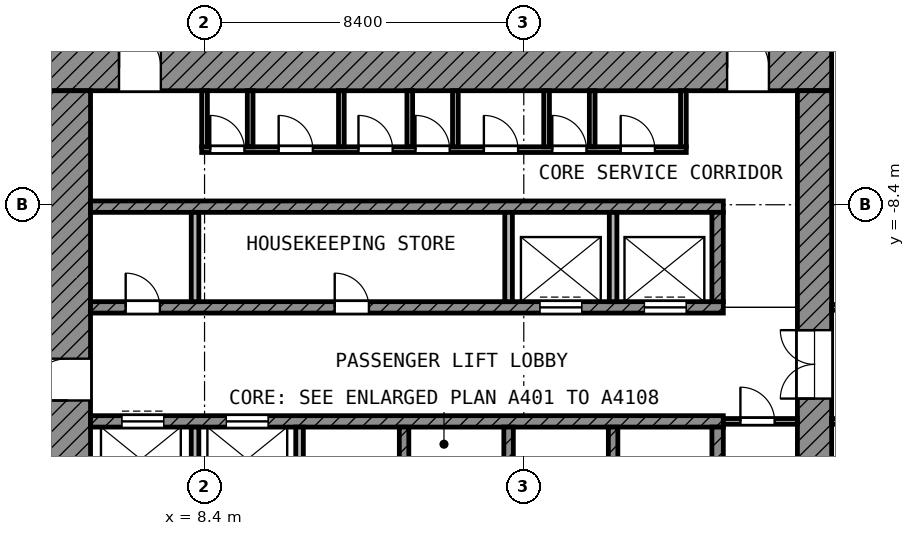
"""IFC4 building model, lengths in metres.
Left out: names, types, materials, properties, quantities, classifications, styles, units other than length and angle.
Written with IfcOpenShell. Run it as: python <this file> out.ifc"""

import sys

from ifc_helpers import new_model, si_unit, direction, frame, frame_2d, origin, place, context, subcontext, project, spatial, rectangle, extrude, element, fill, save


model = new_model("IFC4")
c1 = context("Model", 3, precision=1e-05, world=origin(), true_north=direction((0.0, 1.0)))
c2 = subcontext(c1, "Body", "Model", "MODEL_VIEW")
j1 = project(units=[si_unit("LENGTHUNIT", "METRE"), si_unit("PLANEANGLEUNIT", "RADIAN")], contexts=[c1])
p1 = place(None, origin())
s1 = spatial("IfcSite", under=j1, at=p1, CompositionType="ELEMENT")
p2 = place(p1, origin())
s2 = spatial("IfcBuilding", under=s1, at=p2, CompositionType="ELEMENT")
p3 = place(p2, frame((0.0, 0.0, 175.2)))
s3 = spatial("IfcBuildingStorey", under=s2, at=p3, CompositionType="ELEMENT", Elevation=175.2)
p4 = place(p3, frame((4.2, -4.8, 0.0), z_axis=(0.0, 0.0, 1.0), x_axis=(1.0, 0.0, 0.0)))
e1 = element("IfcWall", 1, at=p4, inside=s3, PredefinedType="SHEAR", context=c2, shape_type="SweptSolid", body=[
    extrude(rectangle(XDim=20.7, YDim=1.2, at=frame_2d((10.35, 0.0))), origin(), (0.0, 0.0, 1.0), 3.6),
])
p5 = place(p4, frame((1.95, 0.0, 0.0)))
e2 = element("IfcOpeningElement", 2, at=p5, cuts=e1, PredefinedType="OPENING", context=c2, shape_type="SweptSolid", body=[
    extrude(rectangle(XDim=1.1, YDim=2.1, at=frame_2d((0.55, 1.05))), frame((0.0, 0.61, 0.0), z_axis=(0.0, -1.0, 0.0), x_axis=(1.0, 0.0, 0.0)), (0.0, 0.0, 1.0), 1.22),
])
p6 = place(p4, frame((17.95, 0.0, 0.0)))
e3 = element("IfcOpeningElement", 3, at=p6, cuts=e1, PredefinedType="OPENING", context=c2, shape_type="SweptSolid", body=[
    extrude(rectangle(XDim=1.1, YDim=2.1, at=frame_2d((0.55, 1.05))), frame((0.0, 0.61, 0.0), z_axis=(0.0, -1.0, 0.0), x_axis=(1.0, 0.0, 0.0)), (0.0, 0.0, 1.0), 1.22),
])
p7 = place(p3, frame((4.8, -24.9, 0.0), z_axis=(0.0, 0.0, 1.0), x_axis=(0.0, 1.0, 0.0)))
e4 = element("IfcWall", 4, at=p7, inside=s3, PredefinedType="SHEAR", context=c2, shape_type="SweptSolid", body=[
    extrude(rectangle(XDim=19.5, YDim=1.2, at=frame_2d((9.75, 0.0))), origin(), (0.0, 0.0, 1.0), 3.6),
])
p8 = place(p7, frame((11.35, 0.0, 0.0)))
e5 = element("IfcOpeningElement", 5, at=p8, cuts=e4, PredefinedType="OPENING", context=c2, shape_type="SweptSolid", body=[
    extrude(rectangle(XDim=1.1, YDim=2.1, at=frame_2d((0.55, 1.05))), frame((0.0, 0.61, 0.0), z_axis=(0.0, -1.0, 0.0), x_axis=(1.0, 0.0, 0.0)), (0.0, 0.0, 1.0), 1.22),
])
p9 = place(p7, frame((2.05, 0.0, 0.0)))
e6 = element("IfcOpeningElement", 6, at=p9, cuts=e4, PredefinedType="OPENING", context=c2, shape_type="SweptSolid", body=[
    extrude(rectangle(XDim=1.1, YDim=2.1, at=frame_2d((0.55, 1.05))), frame((0.0, 0.61, 0.0), z_axis=(0.0, -1.0, 0.0), x_axis=(1.0, 0.0, 0.0)), (0.0, 0.0, 1.0), 1.22),
])
p10 = place(p3, frame((24.45, -24.0, 0.0), z_axis=(0.0, 0.0, 1.0), x_axis=(0.0, 1.0, 0.0)))
e7 = element("IfcWall", 7, at=p10, inside=s3, PredefinedType="SHEAR", context=c2, shape_type="SweptSolid", body=[
    extrude(rectangle(XDim=18.6, YDim=0.9, at=frame_2d((9.3, 0.0))), origin(), (0.0, 0.0, 1.0), 3.6),
])
p11 = place(p10, frame((10.5, 0.0, 0.0)))
e8 = element("IfcOpeningElement", 8, at=p11, cuts=e7, PredefinedType="OPENING", context=c2, shape_type="SweptSolid", body=[
    extrude(rectangle(XDim=1.8, YDim=2.1, at=frame_2d((0.9, 1.05))), frame((0.0, 0.46, 0.0), z_axis=(0.0, -1.0, 0.0), x_axis=(1.0, 0.0, 0.0)), (0.0, 0.0, 1.0), 0.92),
])
p12 = place(p3, frame((5.4, -8.45, 0.0), z_axis=(0.0, 0.0, 1.0), x_axis=(1.0, 0.0, 0.0)))
e9 = element("IfcWall", 9, at=p12, inside=s3, PredefinedType="SHEAR", context=c2, shape_type="SweptSolid", body=[
    extrude(rectangle(XDim=16.65, YDim=0.3, at=frame_2d((8.325, 0.0))), origin(), (0.0, 0.0, 1.0), 3.6),
])
p13 = place(p3, frame((5.4, -11.1, 0.0), z_axis=(0.0, 0.0, 1.0), x_axis=(1.0, 0.0, 0.0)))
e10 = element("IfcWall", 10, at=p13, inside=s3, PredefinedType="SHEAR", context=c2, shape_type="SweptSolid", body=[
    extrude(rectangle(XDim=16.65, YDim=0.3, at=frame_2d((8.325, 0.0))), origin(), (0.0, 0.0, 1.0), 3.6),
])
p14 = place(p13, frame((11.825, 0.0, 0.0)))
e11 = element("IfcOpeningElement", 11, at=p14, cuts=e10, PredefinedType="OPENING", context=c2, shape_type="SweptSolid", body=[
    extrude(rectangle(XDim=1.1, YDim=2.1, at=frame_2d((0.55, 1.05))), frame((0.0, 0.16, 0.0), z_axis=(0.0, -1.0, 0.0), x_axis=(1.0, 0.0, 0.0)), (0.0, 0.0, 1.0), 0.32),
])
p15 = place(p13, frame((14.575, 0.0, 0.0)))
e12 = element("IfcOpeningElement", 12, at=p15, cuts=e10, PredefinedType="OPENING", context=c2, shape_type="SweptSolid", body=[
    extrude(rectangle(XDim=1.1, YDim=2.1, at=frame_2d((0.55, 1.05))), frame((0.0, 0.16, 0.0), z_axis=(0.0, -1.0, 0.0), x_axis=(1.0, 0.0, 0.0)), (0.0, 0.0, 1.0), 0.32),
])
p16 = place(p13, frame((0.925, 0.0, 0.0)))
e13 = element("IfcOpeningElement", 13, at=p16, cuts=e10, PredefinedType="OPENING", context=c2, shape_type="SweptSolid", body=[
    extrude(rectangle(XDim=0.9, YDim=2.1, at=frame_2d((0.45, 1.05))), frame((0.0, 0.16, 0.0), z_axis=(0.0, -1.0, 0.0), x_axis=(1.0, 0.0, 0.0)), (0.0, 0.0, 1.0), 0.32),
])
p17 = place(p13, frame((6.425, 0.0, 0.0)))
e14 = element("IfcOpeningElement", 14, at=p17, cuts=e10, PredefinedType="OPENING", context=c2, shape_type="SweptSolid", body=[
    extrude(rectangle(XDim=0.9, YDim=2.1, at=frame_2d((0.45, 1.05))), frame((0.0, 0.16, 0.0), z_axis=(0.0, -1.0, 0.0), x_axis=(1.0, 0.0, 0.0)), (0.0, 0.0, 1.0), 0.32),
])
p18 = place(p3, frame((5.4, -14.1, 0.0), z_axis=(0.0, 0.0, 1.0), x_axis=(1.0, 0.0, 0.0)))
e15 = element("IfcWall", 15, at=p18, inside=s3, PredefinedType="SHEAR", context=c2, shape_type="SweptSolid", body=[
    extrude(rectangle(XDim=16.65, YDim=0.3, at=frame_2d((8.325, 0.0))), origin(), (0.0, 0.0, 1.0), 3.6),
])
p19 = place(p18, frame((0.825, 0.0, 0.0)))
e16 = element("IfcOpeningElement", 16, at=p19, cuts=e15, PredefinedType="OPENING", context=c2, shape_type="SweptSolid", body=[
    extrude(rectangle(XDim=1.1, YDim=2.1, at=frame_2d((0.55, 1.05))), frame((0.0, 0.16, 0.0), z_axis=(0.0, -1.0, 0.0), x_axis=(1.0, 0.0, 0.0)), (0.0, 0.0, 1.0), 0.32),
])
p20 = place(p18, frame((3.575, 0.0, 0.0)))
e17 = element("IfcOpeningElement", 17, at=p20, cuts=e15, PredefinedType="OPENING", context=c2, shape_type="SweptSolid", body=[
    extrude(rectangle(XDim=1.1, YDim=2.1, at=frame_2d((0.55, 1.05))), frame((0.0, 0.16, 0.0), z_axis=(0.0, -1.0, 0.0), x_axis=(1.0, 0.0, 0.0)), (0.0, 0.0, 1.0), 0.32),
])
p21 = place(p3, frame((21.9, -10.95, 0.0), z_axis=(0.0, 0.0, 1.0), x_axis=(0.0, 1.0, 0.0)))
e18 = element("IfcWall", 18, at=p21, inside=s3, PredefinedType="SHEAR", context=c2, shape_type="SweptSolid", body=[
    extrude(rectangle(XDim=2.35, YDim=0.3, at=frame_2d((1.175, 0.0))), origin(), (0.0, 0.0, 1.0), 3.6),
])
p22 = place(p3, frame((21.9, -16.6, 0.0), z_axis=(0.0, 0.0, 1.0), x_axis=(0.0, 1.0, 0.0)))
e19 = element("IfcWall", 19, at=p22, inside=s3, PredefinedType="SHEAR", context=c2, shape_type="SweptSolid", body=[
    extrude(rectangle(XDim=2.35, YDim=0.3, at=frame_2d((1.175, 0.0))), origin(), (0.0, 0.0, 1.0), 3.6),
])
for number, where, z_axis, x_axis in (
    (20, (8.15, -10.95, 0.0), (0.0, 0.0, 1.0), (0.0, 1.0, 0.0)),
    (21, (16.4, -10.95, 0.0), (0.0, 0.0, 1.0), (0.0, 1.0, 0.0)),
    (22, (19.15, -10.95, 0.0), (0.0, 0.0, 1.0), (0.0, 1.0, 0.0)),
):
    element("IfcWall", number, at=place(p3, frame(where, z_axis=z_axis, x_axis=x_axis)), inside=s3, PredefinedType="PARTITIONING", context=c2, shape_type="SweptSolid", body=[
        extrude(rectangle(XDim=2.35, YDim=0.2, at=frame_2d((1.175, 0.0))), origin(), (0.0, 0.0, 1.0), 3.6),
    ])
for number, where, z_axis, x_axis in (
    (23, (8.15, -16.6, 0.0), (0.0, 0.0, 1.0), (0.0, 1.0, 0.0)),
    (24, (10.9, -16.6, 0.0), (0.0, 0.0, 1.0), (0.0, 1.0, 0.0)),
):
    element("IfcWall", number, at=place(p3, frame(where, z_axis=z_axis, x_axis=x_axis)), inside=s3, PredefinedType="PARTITIONING", context=c2, shape_type="SweptSolid", body=[
        extrude(rectangle(XDim=2.35, YDim=0.2, at=frame_2d((1.175, 0.0))), origin(), (0.0, 0.0, 1.0), 3.6),
    ])
for number, where, z_axis, x_axis in (
    (25, (13.65, -16.6, 0.0), (0.0, 0.0, 1.0), (0.0, 1.0, 0.0)),
    (26, (16.4, -16.6, 0.0), (0.0, 0.0, 1.0), (0.0, 1.0, 0.0)),
    (27, (19.15, -16.6, 0.0), (0.0, 0.0, 1.0), (0.0, 1.0, 0.0)),
):
    element("IfcWall", number, at=place(p3, frame(where, z_axis=z_axis, x_axis=x_axis)), inside=s3, PredefinedType="SHEAR", context=c2, shape_type="SweptSolid", body=[
        extrude(rectangle(XDim=2.35, YDim=0.25, at=frame_2d((1.175, 0.0))), origin(), (0.0, 0.0, 1.0), 3.6),
    ])
p23 = place(p3, frame((22.05, -14.1, 0.0), z_axis=(0.0, 0.0, 1.0), x_axis=(1.0, 0.0, 0.0)))
e28 = element("IfcWall", 28, at=p23, inside=s3, PredefinedType="PARTITIONING", context=c2, shape_type="SweptSolid", body=[
    extrude(rectangle(XDim=1.95, YDim=0.15, at=frame_2d((0.975, 0.0))), origin(), (0.0, 0.0, 1.0), 3.6),
])
p24 = place(p23, frame((0.45, 0.0, 0.0)))
e29 = element("IfcOpeningElement", 29, at=p24, cuts=e28, PredefinedType="OPENING", context=c2, shape_type="SweptSolid", body=[
    extrude(rectangle(XDim=0.9, YDim=2.1, at=frame_2d((0.45, 1.05))), frame((0.0, 0.085, 0.0), z_axis=(0.0, -1.0, 0.0), x_axis=(1.0, 0.0, 0.0)), (0.0, 0.0, 1.0), 0.17),
])
p25 = place(p3, frame((8.325, -6.95, 0.0), z_axis=(0.0, 0.0, 1.0), x_axis=(1.0, 0.0, 0.0)))
e30 = element("IfcWall", 30, at=p25, inside=s3, PredefinedType="PARTITIONING", context=c2, shape_type="SweptSolid", body=[
    extrude(rectangle(XDim=12.75, YDim=0.15, at=frame_2d((6.375, 0.0))), origin(), (0.0, 0.0, 1.0), 3.6),
])
p26 = place(p25, frame((0.225, 0.0, 0.0)))
e31 = element("IfcOpeningElement", 31, at=p26, cuts=e30, PredefinedType="OPENING", context=c2, shape_type="SweptSolid", body=[
    extrude(rectangle(XDim=0.9, YDim=2.1, at=frame_2d((0.45, 1.05))), frame((0.0, 0.085, 0.0), z_axis=(0.0, -1.0, 0.0), x_axis=(1.0, 0.0, 0.0)), (0.0, 0.0, 1.0), 0.17),
])
p27 = place(p25, frame((2.025, 0.0, 0.0)))
e32 = element("IfcOpeningElement", 32, at=p27, cuts=e30, PredefinedType="OPENING", context=c2, shape_type="SweptSolid", body=[
    extrude(rectangle(XDim=0.9, YDim=2.1, at=frame_2d((0.45, 1.05))), frame((0.0, 0.085, 0.0), z_axis=(0.0, -1.0, 0.0), x_axis=(1.0, 0.0, 0.0)), (0.0, 0.0, 1.0), 0.17),
])
p28 = place(p25, frame((4.125, 0.0, 0.0)))
e33 = element("IfcOpeningElement", 33, at=p28, cuts=e30, PredefinedType="OPENING", context=c2, shape_type="SweptSolid", body=[
    extrude(rectangle(XDim=0.9, YDim=2.1, at=frame_2d((0.45, 1.05))), frame((0.0, 0.085, 0.0), z_axis=(0.0, -1.0, 0.0), x_axis=(1.0, 0.0, 0.0)), (0.0, 0.0, 1.0), 0.17),
])
p29 = place(p25, frame((5.625, 0.0, 0.0)))
e34 = element("IfcOpeningElement", 34, at=p29, cuts=e30, PredefinedType="OPENING", context=c2, shape_type="SweptSolid", body=[
    extrude(rectangle(XDim=0.9, YDim=2.1, at=frame_2d((0.45, 1.05))), frame((0.0, 0.085, 0.0), z_axis=(0.0, -1.0, 0.0), x_axis=(1.0, 0.0, 0.0)), (0.0, 0.0, 1.0), 0.17),
])
p30 = place(p25, frame((7.425, 0.0, 0.0)))
e35 = element("IfcOpeningElement", 35, at=p30, cuts=e30, PredefinedType="OPENING", context=c2, shape_type="SweptSolid", body=[
    extrude(rectangle(XDim=0.9, YDim=2.1, at=frame_2d((0.45, 1.05))), frame((0.0, 0.085, 0.0), z_axis=(0.0, -1.0, 0.0), x_axis=(1.0, 0.0, 0.0)), (0.0, 0.0, 1.0), 0.17),
])
p31 = place(p25, frame((9.225, 0.0, 0.0)))
e36 = element("IfcOpeningElement", 36, at=p31, cuts=e30, PredefinedType="OPENING", context=c2, shape_type="SweptSolid", body=[
    extrude(rectangle(XDim=0.9, YDim=2.1, at=frame_2d((0.45, 1.05))), frame((0.0, 0.085, 0.0), z_axis=(0.0, -1.0, 0.0), x_axis=(1.0, 0.0, 0.0)), (0.0, 0.0, 1.0), 0.17),
])
p32 = place(p25, frame((11.025, 0.0, 0.0)))
e37 = element("IfcOpeningElement", 37, at=p32, cuts=e30, PredefinedType="OPENING", context=c2, shape_type="SweptSolid", body=[
    extrude(rectangle(XDim=0.9, YDim=2.1, at=frame_2d((0.45, 1.05))), frame((0.0, 0.085, 0.0), z_axis=(0.0, -1.0, 0.0), x_axis=(1.0, 0.0, 0.0)), (0.0, 0.0, 1.0), 0.17),
])
for number, where, z_axis, x_axis in (
    (38, (8.4, -6.875, 0.0), (0.0, 0.0, 1.0), (0.0, 1.0, 0.0)),
    (39, (9.6, -6.875, 0.0), (0.0, 0.0, 1.0), (0.0, 1.0, 0.0)),
    (40, (12.0, -6.875, 0.0), (0.0, 0.0, 1.0), (0.0, 1.0, 0.0)),
    (41, (13.8, -6.875, 0.0), (0.0, 0.0, 1.0), (0.0, 1.0, 0.0)),
    (42, (15.0, -6.875, 0.0), (0.0, 0.0, 1.0), (0.0, 1.0, 0.0)),
    (43, (17.4, -6.875, 0.0), (0.0, 0.0, 1.0), (0.0, 1.0, 0.0)),
    (44, (18.6, -6.875, 0.0), (0.0, 0.0, 1.0), (0.0, 1.0, 0.0)),
    (45, (21.0, -6.875, 0.0), (0.0, 0.0, 1.0), (0.0, 1.0, 0.0)),
):
    element("IfcWall", number, at=place(p3, frame(where, z_axis=z_axis, x_axis=x_axis)), inside=s3, PredefinedType="PARTITIONING", context=c2, shape_type="SweptSolid", body=[
        extrude(rectangle(XDim=1.475, YDim=0.15, at=frame_2d((0.738, 0.0))), origin(), (0.0, 0.0, 1.0), 3.6),
    ])
p33 = place(p3, frame((24.9, -14.1, 0.0), z_axis=(0.0, 0.0, 1.0), x_axis=(1.0, 0.0, 0.0)))
e46 = element("IfcWall", 46, at=p33, inside=s3, PredefinedType="PARTITIONING", context=c2, shape_type="SweptSolid", body=[
    extrude(rectangle(XDim=4.425, YDim=0.15, at=frame_2d((2.212, 0.0))), origin(), (0.0, 0.0, 1.0), 3.6),
])
p34 = place(p33, frame((1.65, 0.0, 0.0)))
e47 = element("IfcOpeningElement", 47, at=p34, cuts=e46, PredefinedType="OPENING", context=c2, shape_type="SweptSolid", body=[
    extrude(rectangle(XDim=1.5, YDim=2.1, at=frame_2d((0.75, 1.05))), frame((0.0, 0.085, 0.0), z_axis=(0.0, -1.0, 0.0), x_axis=(1.0, 0.0, 0.0)), (0.0, 0.0, 1.0), 0.17),
])
p35 = place(p3, frame((24.9, -11.1, 0.0), z_axis=(0.0, 0.0, 1.0), x_axis=(1.0, 0.0, 0.0)))
e48 = element("IfcWall", 48, at=p35, inside=s3, PredefinedType="PARTITIONING", context=c2, shape_type="SweptSolid", body=[
    extrude(rectangle(XDim=4.498, YDim=0.15, at=frame_2d((2.249, 0.0))), origin(), (0.0, 0.0, 1.0), 3.6),
])
p36 = place(p35, frame((1.799, 0.0, 0.0)))
e49 = element("IfcOpeningElement", 49, at=p36, cuts=e48, PredefinedType="OPENING", context=c2, shape_type="SweptSolid", body=[
    extrude(rectangle(XDim=1.2, YDim=2.1, at=frame_2d((0.6, 1.05))), frame((0.0, 0.085, 0.0), z_axis=(0.0, -1.0, 0.0), x_axis=(1.0, 0.0, 0.0)), (0.0, 0.0, 1.0), 0.17),
])
p37 = place(p14, origin())
e50 = element("IfcDoor", 50, at=p37, inside=s3, OperationType="DOUBLE_DOOR_SLIDING", PredefinedType="DOOR", context=c2, shape_type="SweptSolid", body=[
    extrude(rectangle(XDim=1.1, YDim=2.1, at=frame_2d((0.55, 1.05))), frame((0.0, 0.025, 0.0), z_axis=(0.0, -1.0, 0.0), x_axis=(1.0, 0.0, 0.0)), (0.0, 0.0, 1.0), 0.05),
])
fill(e11, e50)
p38 = place(p15, origin())
e51 = element("IfcDoor", 51, at=p38, inside=s3, OperationType="DOUBLE_DOOR_SLIDING", PredefinedType="DOOR", context=c2, shape_type="SweptSolid", body=[
    extrude(rectangle(XDim=1.1, YDim=2.1, at=frame_2d((0.55, 1.05))), frame((0.0, 0.025, 0.0), z_axis=(0.0, -1.0, 0.0), x_axis=(1.0, 0.0, 0.0)), (0.0, 0.0, 1.0), 0.05),
])
fill(e12, e51)
p39 = place(p19, origin())
e52 = element("IfcDoor", 52, at=p39, inside=s3, OperationType="DOUBLE_DOOR_SLIDING", PredefinedType="DOOR", context=c2, shape_type="SweptSolid", body=[
    extrude(rectangle(XDim=1.1, YDim=2.1, at=frame_2d((0.55, 1.05))), frame((0.0, 0.025, 0.0), z_axis=(0.0, -1.0, 0.0), x_axis=(1.0, 0.0, 0.0)), (0.0, 0.0, 1.0), 0.05),
])
fill(e16, e52)
p40 = place(p20, origin())
e53 = element("IfcDoor", 53, at=p40, inside=s3, OperationType="DOUBLE_DOOR_SLIDING", PredefinedType="DOOR", context=c2, shape_type="SweptSolid", body=[
    extrude(rectangle(XDim=1.1, YDim=2.1, at=frame_2d((0.55, 1.05))), frame((0.0, 0.025, 0.0), z_axis=(0.0, -1.0, 0.0), x_axis=(1.0, 0.0, 0.0)), (0.0, 0.0, 1.0), 0.05),
])
fill(e17, e53)
p41 = place(p8, origin())
e54 = element("IfcDoor", 54, at=p41, inside=s3, OperationType="SINGLE_SWING_LEFT", PredefinedType="DOOR", context=c2, shape_type="SweptSolid", body=[
    extrude(rectangle(XDim=1.1, YDim=2.1, at=frame_2d((0.55, 1.05))), frame((0.0, 0.025, 0.0), z_axis=(0.0, -1.0, 0.0), x_axis=(1.0, 0.0, 0.0)), (0.0, 0.0, 1.0), 0.05),
])
fill(e5, e54)
p42 = place(p5, origin())
e55 = element("IfcDoor", 55, at=p42, inside=s3, OperationType="SINGLE_SWING_LEFT", PredefinedType="DOOR", context=c2, shape_type="SweptSolid", body=[
    extrude(rectangle(XDim=1.1, YDim=2.1, at=frame_2d((0.55, 1.05))), frame((0.0, 0.025, 0.0), z_axis=(0.0, -1.0, 0.0), x_axis=(1.0, 0.0, 0.0)), (0.0, 0.0, 1.0), 0.05),
])
fill(e2, e55)
p43 = place(p6, origin())
e56 = element("IfcDoor", 56, at=p43, inside=s3, OperationType="SINGLE_SWING_LEFT", PredefinedType="DOOR", context=c2, shape_type="SweptSolid", body=[
    extrude(rectangle(XDim=1.1, YDim=2.1, at=frame_2d((0.55, 1.05))), frame((0.0, 0.025, 0.0), z_axis=(0.0, -1.0, 0.0), x_axis=(1.0, 0.0, 0.0)), (0.0, 0.0, 1.0), 0.05),
])
fill(e3, e56)
p44 = place(p11, origin())
e57 = element("IfcDoor", 57, at=p44, inside=s3, OperationType="DOUBLE_DOOR_SINGLE_SWING", PredefinedType="DOOR", context=c2, shape_type="SweptSolid", body=[
    extrude(rectangle(XDim=1.8, YDim=2.1, at=frame_2d((0.9, 1.05))), frame((0.0, 0.025, 0.0), z_axis=(0.0, -1.0, 0.0), x_axis=(1.0, 0.0, 0.0)), (0.0, 0.0, 1.0), 0.05),
])
fill(e8, e57)
p45 = place(p26, origin())
e58 = element("IfcDoor", 58, at=p45, inside=s3, OperationType="SINGLE_SWING_LEFT", PredefinedType="DOOR", context=c2, shape_type="SweptSolid", body=[
    extrude(rectangle(XDim=0.9, YDim=2.1, at=frame_2d((0.45, 1.05))), frame((0.0, 0.025, 0.0), z_axis=(0.0, -1.0, 0.0), x_axis=(1.0, 0.0, 0.0)), (0.0, 0.0, 1.0), 0.05),
])
fill(e31, e58)
p46 = place(p27, origin())
e59 = element("IfcDoor", 59, at=p46, inside=s3, OperationType="SINGLE_SWING_LEFT", PredefinedType="DOOR", context=c2, shape_type="SweptSolid", body=[
    extrude(rectangle(XDim=0.9, YDim=2.1, at=frame_2d((0.45, 1.05))), frame((0.0, 0.025, 0.0), z_axis=(0.0, -1.0, 0.0), x_axis=(1.0, 0.0, 0.0)), (0.0, 0.0, 1.0), 0.05),
])
fill(e32, e59)
p47 = place(p28, origin())
e60 = element("IfcDoor", 60, at=p47, inside=s3, OperationType="SINGLE_SWING_LEFT", PredefinedType="DOOR", context=c2, shape_type="SweptSolid", body=[
    extrude(rectangle(XDim=0.9, YDim=2.1, at=frame_2d((0.45, 1.05))), frame((0.0, 0.025, 0.0), z_axis=(0.0, -1.0, 0.0), x_axis=(1.0, 0.0, 0.0)), (0.0, 0.0, 1.0), 0.05),
])
fill(e33, e60)
p48 = place(p29, origin())
e61 = element("IfcDoor", 61, at=p48, inside=s3, OperationType="SINGLE_SWING_LEFT", PredefinedType="DOOR", context=c2, shape_type="SweptSolid", body=[
    extrude(rectangle(XDim=0.9, YDim=2.1, at=frame_2d((0.45, 1.05))), frame((0.0, 0.025, 0.0), z_axis=(0.0, -1.0, 0.0), x_axis=(1.0, 0.0, 0.0)), (0.0, 0.0, 1.0), 0.05),
])
fill(e34, e61)
p49 = place(p30, origin())
e62 = element("IfcDoor", 62, at=p49, inside=s3, OperationType="SINGLE_SWING_LEFT", PredefinedType="DOOR", context=c2, shape_type="SweptSolid", body=[
    extrude(rectangle(XDim=0.9, YDim=2.1, at=frame_2d((0.45, 1.05))), frame((0.0, 0.025, 0.0), z_axis=(0.0, -1.0, 0.0), x_axis=(1.0, 0.0, 0.0)), (0.0, 0.0, 1.0), 0.05),
])
fill(e35, e62)
p50 = place(p31, origin())
e63 = element("IfcDoor", 63, at=p50, inside=s3, OperationType="SINGLE_SWING_LEFT", PredefinedType="DOOR", context=c2, shape_type="SweptSolid", body=[
    extrude(rectangle(XDim=0.9, YDim=2.1, at=frame_2d((0.45, 1.05))), frame((0.0, 0.025, 0.0), z_axis=(0.0, -1.0, 0.0), x_axis=(1.0, 0.0, 0.0)), (0.0, 0.0, 1.0), 0.05),
])
fill(e36, e63)
p51 = place(p32, origin())
e64 = element("IfcDoor", 64, at=p51, inside=s3, OperationType="SINGLE_SWING_LEFT", PredefinedType="DOOR", context=c2, shape_type="SweptSolid", body=[
    extrude(rectangle(XDim=0.9, YDim=2.1, at=frame_2d((0.45, 1.05))), frame((0.0, 0.025, 0.0), z_axis=(0.0, -1.0, 0.0), x_axis=(1.0, 0.0, 0.0)), (0.0, 0.0, 1.0), 0.05),
])
fill(e37, e64)
p52 = place(p24, origin())
e65 = element("IfcDoor", 65, at=p52, inside=s3, OperationType="SINGLE_SWING_LEFT", PredefinedType="DOOR", context=c2, shape_type="SweptSolid", body=[
    extrude(rectangle(XDim=0.9, YDim=2.1, at=frame_2d((0.45, 1.05))), frame((0.0, 0.025, 0.0), z_axis=(0.0, -1.0, 0.0), x_axis=(1.0, 0.0, 0.0)), (0.0, 0.0, 1.0), 0.05),
])
fill(e29, e65)
p53 = place(p16, origin())
e66 = element("IfcDoor", 66, at=p53, inside=s3, OperationType="SINGLE_SWING_LEFT", PredefinedType="DOOR", context=c2, shape_type="SweptSolid", body=[
    extrude(rectangle(XDim=0.9, YDim=2.1, at=frame_2d((0.45, 1.05))), frame((0.0, 0.025, 0.0), z_axis=(0.0, -1.0, 0.0), x_axis=(1.0, 0.0, 0.0)), (0.0, 0.0, 1.0), 0.05),
])
fill(e13, e66)
p54 = place(p17, origin())
e67 = element("IfcDoor", 67, at=p54, inside=s3, OperationType="SINGLE_SWING_LEFT", PredefinedType="DOOR", context=c2, shape_type="SweptSolid", body=[
    extrude(rectangle(XDim=0.9, YDim=2.1, at=frame_2d((0.45, 1.05))), frame((0.0, 0.025, 0.0), z_axis=(0.0, -1.0, 0.0), x_axis=(1.0, 0.0, 0.0)), (0.0, 0.0, 1.0), 0.05),
])
fill(e14, e67)
save(model, sys.argv[1])
